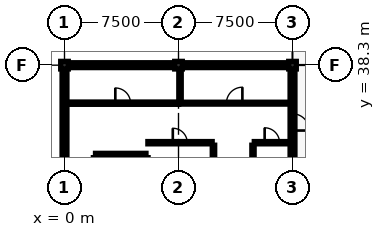
"""IFC4 building model, lengths in metres.
Left out: names, types, materials, properties, quantities, classifications, styles, units other than length and angle.
Written with IfcOpenShell. Run it as: python <this file> out.ifc"""

import sys

from ifc_helpers import new_model, si_unit, direction, frame, frame_2d, origin, origin_2d, place, context, subcontext, project, spatial, rectangle, extrude, element, fill, save


model = new_model("IFC4")
c1 = context("Model", 3, precision=1e-05, world=origin(), true_north=direction((0.0, 1.0)))
c2 = subcontext(c1, "Body", "Model", "MODEL_VIEW")
j1 = project(units=[si_unit("LENGTHUNIT", "METRE"), si_unit("PLANEANGLEUNIT", "RADIAN")], contexts=[c1])
p1 = place(None, origin())
s1 = spatial("IfcSite", under=j1, at=p1, CompositionType="ELEMENT")
p2 = place(p1, origin())
s2 = spatial("IfcBuilding", under=s1, at=p2, CompositionType="ELEMENT")
p3 = place(p2, frame((0.0, 0.0, 21.5)))
s3 = spatial("IfcBuildingStorey", under=s2, at=p3, CompositionType="ELEMENT", Elevation=21.5)
for number, where, z_axis, x_axis in (
    (1, (0.0, 38.3, 0.0), (0.0, 0.0, 1.0), (1.0, 0.0, 0.0)),
    (2, (7.5, 38.3, 0.0), (0.0, 0.0, 1.0), (1.0, 0.0, 0.0)),
    (3, (15.0, 38.3, 0.0), (0.0, 0.0, 1.0), (1.0, 0.0, 0.0)),
):
    element("IfcColumn", number, at=place(p3, frame(where, z_axis=z_axis, x_axis=x_axis)), inside=s3, PredefinedType="COLUMN", context=c2, shape_type="SweptSolid", body=[
        extrude(rectangle(XDim=0.5, YDim=0.5, at=origin_2d()), origin(), (0.0, 0.0, 1.0), 3.8),
    ])
p4 = place(p3, frame((15.0, 38.05, 0.0), z_axis=(0.0, 0.0, 1.0), x_axis=(0.0, -1.0, 0.0)))
e4 = element("IfcWall", 4, at=p4, inside=s3, PredefinedType="SOLIDWALL", context=c2, shape_type="SweptSolid", body=[
    extrude(rectangle(XDim=7.0, YDim=0.32, at=frame_2d((3.5, 0.0))), origin(), (0.0, 0.0, 1.0), 3.7),
])
p5 = place(p4, frame((2.95, 0.0, 0.0)))
e5 = element("IfcOpeningElement", 5, at=p5, cuts=e4, PredefinedType="OPENING", context=c2, shape_type="SweptSolid", body=[
    extrude(rectangle(XDim=1.1, YDim=2.15, at=frame_2d((0.55, 1.075))), frame((0.0, 0.172, 0.0), z_axis=(0.0, -1.0, 0.0), x_axis=(1.0, 0.0, 0.0)), (0.0, 0.0, 1.0), 0.344),
])
for number, where, z_axis, x_axis in (
    (6, (0.0, 31.05, 0.0), (0.0, 0.0, 1.0), (0.0, 1.0, 0.0)),
    (7, (0.25, 38.3, 0.0), (0.0, 0.0, 1.0), (1.0, 0.0, 0.0)),
    (8, (7.75, 38.3, 0.0), (0.0, 0.0, 1.0), (1.0, 0.0, 0.0)),
):
    element("IfcWall", number, at=place(p3, frame(where, z_axis=z_axis, x_axis=x_axis)), inside=s3, PredefinedType="SOLIDWALL", context=c2, shape_type="SweptSolid", body=[
        extrude(rectangle(XDim=7.0, YDim=0.32, at=frame_2d((3.5, 0.0))), origin(), (0.0, 0.0, 1.0), 3.7),
    ])
p6 = place(p3, frame((5.36, 24.985, 0.0), z_axis=(0.0, 0.0, 1.0), x_axis=(0.0, 1.0, 0.0)))
e9 = element("IfcWall", 9, at=p6, inside=s3, PredefinedType="SHEAR", context=c2, shape_type="SweptSolid", body=[
    extrude(rectangle(XDim=7.23, YDim=0.28, at=frame_2d((3.615, 0.0))), origin(), (0.0, 0.0, 1.0), 3.72),
])
p7 = place(p3, frame((5.36, 32.36, 0.0), z_axis=(0.0, 0.0, 1.0), x_axis=(-1.0, 0.0, 0.0)))
e10 = element("IfcWall", 10, at=p7, inside=s3, PredefinedType="SHEAR", context=c2, shape_type="SweptSolid", body=[
    extrude(rectangle(XDim=3.32, YDim=0.28, at=frame_2d((1.66, 0.0))), origin(), (0.0, 0.0, 1.0), 3.72),
])
p8 = place(p3, frame((2.04, 32.215, 0.0), z_axis=(0.0, 0.0, 1.0), x_axis=(0.0, -1.0, 0.0)))
e11 = element("IfcWall", 11, at=p8, inside=s3, PredefinedType="SHEAR", context=c2, shape_type="SweptSolid", body=[
    extrude(rectangle(XDim=7.23, YDim=0.28, at=frame_2d((3.615, 0.0))), origin(), (0.0, 0.0, 1.0), 3.72),
])
p9 = place(p3, frame((0.172, 35.8, 0.0), z_axis=(0.0, 0.0, 1.0), x_axis=(1.0, 0.0, 0.0)))
e12 = element("IfcWall", 12, at=p9, inside=s3, PredefinedType="PARTITIONING", context=c2, shape_type="SweptSolid", body=[
    extrude(rectangle(XDim=7.343, YDim=0.15, at=frame_2d((3.671, 0.0))), origin(), (0.0, 0.0, 1.0), 3.7),
])
p10 = place(p9, frame((3.171, 0.0, 0.0)))
e13 = element("IfcOpeningElement", 13, at=p10, cuts=e12, PredefinedType="OPENING", context=c2, shape_type="SweptSolid", body=[
    extrude(rectangle(XDim=1.0, YDim=2.15, at=frame_2d((0.5, 1.075))), frame((0.0, 0.087, 0.0), z_axis=(0.0, -1.0, 0.0), x_axis=(1.0, 0.0, 0.0)), (0.0, 0.0, 1.0), 0.174),
])
p11 = place(p3, frame((7.527, 35.8, 0.0), z_axis=(0.0, 0.0, 1.0), x_axis=(1.0, 0.0, 0.0)))
e14 = element("IfcWall", 14, at=p11, inside=s3, PredefinedType="PARTITIONING", context=c2, shape_type="SweptSolid", body=[
    extrude(rectangle(XDim=7.301, YDim=0.125, at=frame_2d((3.65, 0.0))), origin(), (0.0, 0.0, 1.0), 3.7),
])
p12 = place(p11, frame((3.125, 0.0, 0.0)))
e15 = element("IfcOpeningElement", 15, at=p12, cuts=e14, PredefinedType="OPENING", context=c2, shape_type="SweptSolid", body=[
    extrude(rectangle(XDim=1.05, YDim=2.15, at=frame_2d((0.525, 1.075))), frame((0.0, 0.074, 0.0), z_axis=(0.0, -1.0, 0.0), x_axis=(1.0, 0.0, 0.0)), (0.0, 0.0, 1.0), 0.149),
])
p13 = place(p3, frame((5.485, 33.2, 0.0), z_axis=(0.0, 0.0, 1.0), x_axis=(1.0, 0.0, 0.0)))
e16 = element("IfcWall", 16, at=p13, inside=s3, PredefinedType="PARTITIONING", context=c2, shape_type="SweptSolid", body=[
    extrude(rectangle(XDim=4.23, YDim=0.15, at=frame_2d((2.115, 0.0))), origin(), (0.0, 0.0, 1.0), 3.7),
])
p14 = place(p13, frame((1.64, 0.0, 0.0)))
e17 = element("IfcOpeningElement", 17, at=p14, cuts=e16, PredefinedType="OPENING", context=c2, shape_type="SweptSolid", body=[
    extrude(rectangle(XDim=0.95, YDim=2.15, at=frame_2d((0.475, 1.075))), frame((0.0, 0.087, 0.0), z_axis=(0.0, -1.0, 0.0), x_axis=(1.0, 0.0, 0.0)), (0.0, 0.0, 1.0), 0.174),
])
p15 = place(p3, frame((12.485, 33.2, 0.0), z_axis=(0.0, 0.0, 1.0), x_axis=(1.0, 0.0, 0.0)))
e18 = element("IfcWall", 18, at=p15, inside=s3, PredefinedType="PARTITIONING", context=c2, shape_type="SweptSolid", body=[
    extrude(rectangle(XDim=2.343, YDim=0.15, at=frame_2d((1.171, 0.0))), origin(), (0.0, 0.0, 1.0), 3.7),
])
p16 = place(p15, frame((0.681, 0.0, 0.0)))
e19 = element("IfcOpeningElement", 19, at=p16, cuts=e18, PredefinedType="OPENING", context=c2, shape_type="SweptSolid", body=[
    extrude(rectangle(XDim=0.98, YDim=2.12, at=frame_2d((0.49, 1.06))), frame((0.0, 0.087, 0.0), z_axis=(0.0, -1.0, 0.0), x_axis=(1.0, 0.0, 0.0)), (0.0, 0.0, 1.0), 0.174),
])
p17 = place(p3, frame((7.6, 35.875, 0.0), z_axis=(0.0, 0.0, 1.0), x_axis=(0.0, 1.0, 0.0)))
e20 = element("IfcWall", 20, at=p17, inside=s3, PredefinedType="PARTITIONING", context=c2, shape_type="SweptSolid", body=[
    extrude(rectangle(XDim=2.164, YDim=0.16, at=frame_2d((1.082, 0.0))), origin(), (0.0, 0.0, 1.0), 3.7),
])
p18 = place(p3, frame((9.8, 24.965, 0.0), z_axis=(0.0, 0.0, 1.0), x_axis=(0.0, 1.0, 0.0)))
e21 = element("IfcWall", 21, at=p18, inside=s3, PredefinedType="PARTITIONING", context=c2, shape_type="SweptSolid", body=[
    extrude(rectangle(XDim=8.07, YDim=0.16, at=frame_2d((4.035, 0.0))), origin(), (0.0, 0.0, 1.0), 3.7),
])
p19 = place(p3, frame((12.4, 15.447, 0.0), z_axis=(0.0, 0.0, 1.0), x_axis=(0.0, 1.0, 0.0)))
e22 = element("IfcWall", 22, at=p19, inside=s3, PredefinedType="PARTITIONING", context=c2, shape_type="SweptSolid", body=[
    extrude(rectangle(XDim=17.588, YDim=0.15, at=frame_2d((8.794, 0.0))), origin(), (0.0, 0.0, 1.0), 3.7),
])
p20 = place(p5, origin())
e23 = element("IfcDoor", 23, at=p20, inside=s3, OperationType="SINGLE_SWING_RIGHT", PredefinedType="DOOR", context=c2, shape_type="SweptSolid", body=[
    extrude(rectangle(XDim=1.1, YDim=2.15, at=frame_2d((0.55, 1.075))), frame((0.0, 0.025, 0.0), z_axis=(0.0, -1.0, 0.0), x_axis=(1.0, 0.0, 0.0)), (0.0, 0.0, 1.0), 0.05),
])
fill(e5, e23)
p21 = place(p10, origin())
e24 = element("IfcDoor", 24, at=p21, inside=s3, OperationType="SINGLE_SWING_LEFT", PredefinedType="DOOR", context=c2, shape_type="SweptSolid", body=[
    extrude(rectangle(XDim=1.0, YDim=2.15, at=frame_2d((0.5, 1.075))), frame((0.0, 0.025, 0.0), z_axis=(0.0, -1.0, 0.0), x_axis=(1.0, 0.0, 0.0)), (0.0, 0.0, 1.0), 0.05),
])
fill(e13, e24)
p22 = place(p12, origin())
e25 = element("IfcDoor", 25, at=p22, inside=s3, OperationType="SINGLE_SWING_RIGHT", PredefinedType="DOOR", context=c2, shape_type="SweptSolid", body=[
    extrude(rectangle(XDim=1.05, YDim=2.15, at=frame_2d((0.525, 1.075))), frame((0.0, 0.025, 0.0), z_axis=(0.0, -1.0, 0.0), x_axis=(1.0, 0.0, 0.0)), (0.0, 0.0, 1.0), 0.05),
])
fill(e15, e25)
p23 = place(p14, origin())
e26 = element("IfcDoor", 26, at=p23, inside=s3, OperationType="SINGLE_SWING_LEFT", PredefinedType="DOOR", context=c2, shape_type="SweptSolid", body=[
    extrude(rectangle(XDim=0.95, YDim=2.15, at=frame_2d((0.475, 1.075))), frame((0.0, 0.025, 0.0), z_axis=(0.0, -1.0, 0.0), x_axis=(1.0, 0.0, 0.0)), (0.0, 0.0, 1.0), 0.05),
])
fill(e17, e26)
p24 = place(p16, origin())
e27 = element("IfcDoor", 27, at=p24, inside=s3, OperationType="SINGLE_SWING_LEFT", PredefinedType="DOOR", context=c2, shape_type="SweptSolid", body=[
    extrude(rectangle(XDim=0.98, YDim=2.12, at=frame_2d((0.49, 1.06))), frame((0.0, 0.025, 0.0), z_axis=(0.0, -1.0, 0.0), x_axis=(1.0, 0.0, 0.0)), (0.0, 0.0, 1.0), 0.05),
])
fill(e19, e27)
save(model, sys.argv[1])
